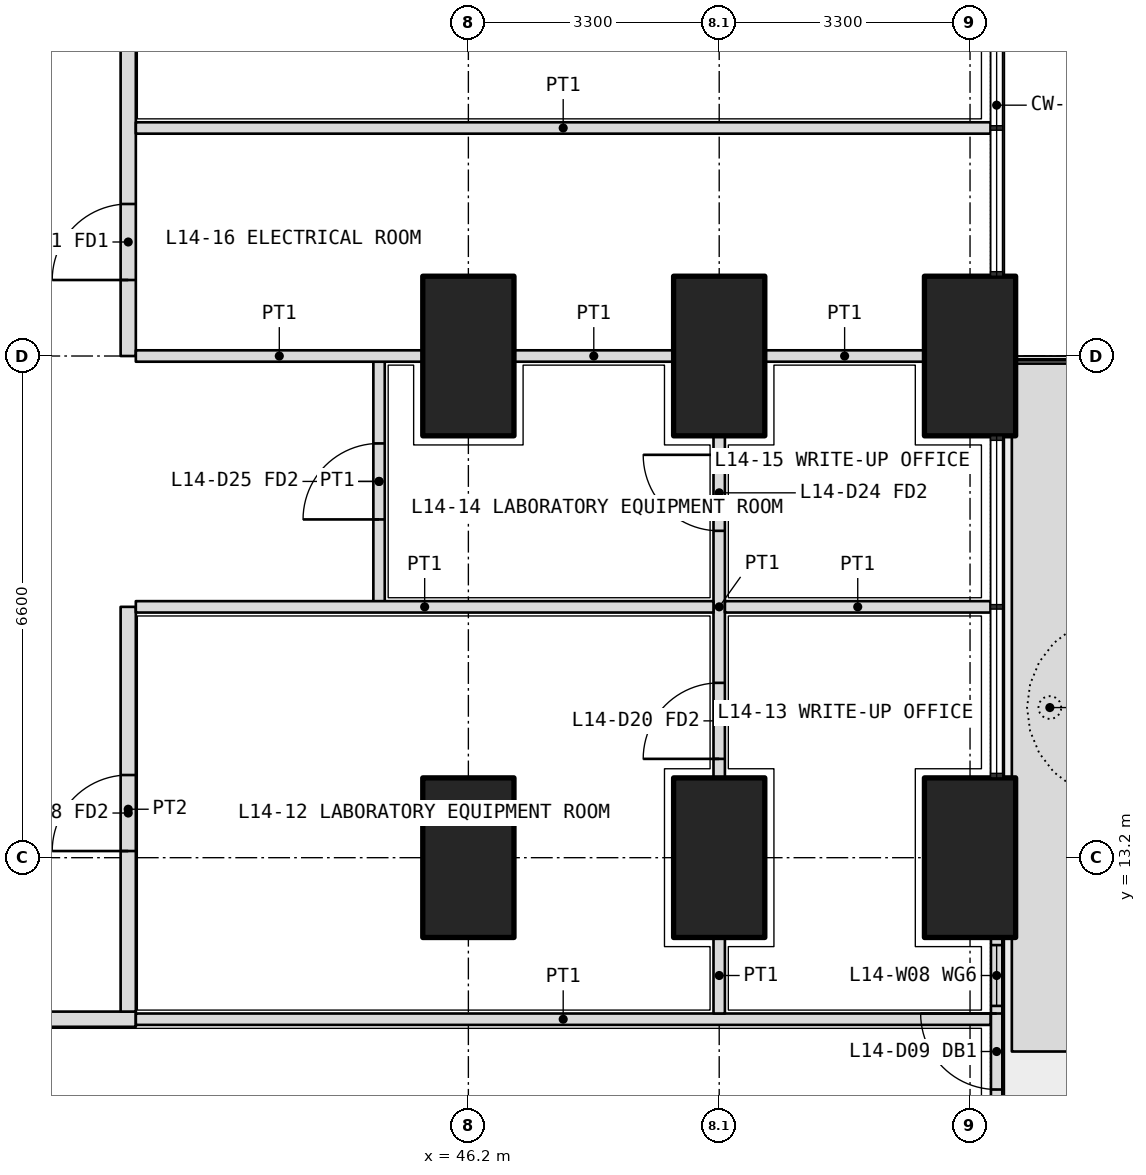
"""IFC4 building model, lengths in metres.
Left out: names, types, materials, properties, quantities, classifications, styles, units other than length and angle.
Written with IfcOpenShell. Run it as: python <this file> out.ifc"""

import sys

from ifc_helpers import new_model, si_unit, direction, frame, frame_2d, origin, origin_2d, place, context, subcontext, project, spatial, polyline, rectangle, outline, extrude, element, fill, save


model = new_model("IFC4")
c1 = context("Model", 3, precision=1e-05, world=origin(), true_north=direction((0.0, 1.0)))
c2 = subcontext(c1, "Body", "Model", "MODEL_VIEW")
j1 = project(units=[si_unit("LENGTHUNIT", "METRE"), si_unit("PLANEANGLEUNIT", "RADIAN")], contexts=[c1])
p1 = place(None, origin())
s1 = spatial("IfcSite", under=j1, at=p1, CompositionType="ELEMENT")
p2 = place(p1, origin())
s2 = spatial("IfcBuilding", under=s1, at=p2, CompositionType="ELEMENT")
p3 = place(p2, frame((0.0, 0.0, 63.3)))
s3 = spatial("IfcBuildingStorey", under=s2, at=p3, CompositionType="ELEMENT", Elevation=63.3)
for number, where, z_axis, x_axis in (
    (1, (52.8, 13.2, 0.0), (0.0, 0.0, 1.0), (0.0, 1.0, 0.0)),
    (2, (52.8, 19.8, 0.0), (0.0, 0.0, 1.0), (0.0, 1.0, 0.0)),
    (3, (49.5, 13.2, 0.0), (0.0, 0.0, 1.0), (0.0, 1.0, 0.0)),
    (4, (49.5, 19.8, 0.0), (0.0, 0.0, 1.0), (0.0, 1.0, 0.0)),
    (5, (46.2, 13.2, 0.0), (0.0, 0.0, 1.0), (0.0, 1.0, 0.0)),
    (6, (46.2, 19.8, 0.0), (0.0, 0.0, 1.0), (0.0, 1.0, 0.0)),
):
    element("IfcColumn", number, at=place(p3, frame(where, z_axis=z_axis, x_axis=x_axis)), inside=s3, PredefinedType="COLUMN", context=c2, shape_type="SweptSolid", body=[
        extrude(rectangle(XDim=2.1, YDim=1.2, at=origin_2d()), origin(), (0.0, 0.0, 1.0), 4.2),
    ])
p4 = place(p3, origin())
e7 = element("IfcWall", 7, at=p4, inside=s3, PredefinedType="USERDEFINED", context=c2, shape_type="SweptSolid", body=[
    extrude(outline(polyline([(53.35, 10.65), (54.35, 10.65), (54.35, 19.7), (53.35, 19.7), (53.35, 10.65)]), holes=[polyline([(53.5, 10.8), (54.2, 10.8), (54.2, 19.55), (53.5, 19.55), (53.5, 10.8)])]), origin(), (0.0, 0.0, 1.0), 1.05),
])
p5 = place(p3, frame((53.15, 7.65, 0.0), z_axis=(0.0, 0.0, 1.0), x_axis=(0.0, 1.0, 0.0)))
e8 = element("IfcWall", 8, at=p5, inside=s3, PredefinedType="SOLIDWALL", context=c2, shape_type="SweptSolid", body=[
    extrude(rectangle(XDim=4.5, YDim=0.15, at=frame_2d((2.25, 0.0))), origin(), (0.0, 0.0, 1.0), 2.6),
])
p6 = place(p5, frame((2.5, 0.0, 0.0)))
e9 = element("IfcOpeningElement", 9, at=p6, cuts=e8, PredefinedType="OPENING", context=c2, shape_type="SweptSolid", body=[
    extrude(rectangle(XDim=1.0, YDim=2.4, at=frame_2d((0.5, 1.2))), frame((0.0, 0.085, 0.0), z_axis=(0.0, -1.0, 0.0), x_axis=(1.0, 0.0, 0.0)), (0.0, 0.0, 1.0), 0.17),
])
p7 = place(p5, frame((0.1, 0.0, 0.1)))
e10 = element("IfcOpeningElement", 10, at=p7, cuts=e8, PredefinedType="OPENING", context=c2, shape_type="SweptSolid", body=[
    extrude(rectangle(XDim=1.9, YDim=2.2, at=frame_2d((0.95, 1.1))), frame((0.0, 0.085, 0.0), z_axis=(0.0, -1.0, 0.0), x_axis=(1.0, 0.0, 0.0)), (0.0, 0.0, 1.0), 0.17),
])
p8 = place(p5, frame((3.6, 0.0, 0.1)))
e11 = element("IfcOpeningElement", 11, at=p8, cuts=e8, PredefinedType="OPENING", context=c2, shape_type="SweptSolid", body=[
    extrude(rectangle(XDim=0.8, YDim=2.2, at=frame_2d((0.4, 1.1))), frame((0.0, 0.085, 0.0), z_axis=(0.0, -1.0, 0.0), x_axis=(1.0, 0.0, 0.0)), (0.0, 0.0, 1.0), 0.17),
])
p9 = place(p3, frame((10.975, 11.075, 0.0), z_axis=(0.0, 0.0, 1.0), x_axis=(1.0, 0.0, 0.0)))
e12 = element("IfcWall", 12, at=p9, inside=s3, PredefinedType="PARTITIONING", context=c2, shape_type="SweptSolid", body=[
    extrude(rectangle(XDim=30.85, YDim=0.2, at=frame_2d((15.425, 0.0))), origin(), (0.0, 0.0, 1.0), 2.85),
])
p10 = place(p9, frame((0.663, 0.0, 0.0)))
e13 = element("IfcOpeningElement", 13, at=p10, cuts=e12, PredefinedType="OPENING", context=c2, shape_type="SweptSolid", body=[
    extrude(rectangle(XDim=1.0, YDim=2.1, at=frame_2d((0.5, 1.05))), frame((0.0, 0.11, 0.0), z_axis=(0.0, -1.0, 0.0), x_axis=(1.0, 0.0, 0.0)), (0.0, 0.0, 1.0), 0.22),
])
p11 = place(p9, frame((3.275, 0.0, 0.0)))
e14 = element("IfcOpeningElement", 14, at=p11, cuts=e12, PredefinedType="OPENING", context=c2, shape_type="SweptSolid", body=[
    extrude(rectangle(XDim=1.2, YDim=2.1, at=frame_2d((0.6, 1.05))), frame((0.0, 0.11, 0.0), z_axis=(0.0, -1.0, 0.0), x_axis=(1.0, 0.0, 0.0)), (0.0, 0.0, 1.0), 0.22),
])
p12 = place(p9, frame((7.125, 0.0, 0.0)))
e15 = element("IfcOpeningElement", 15, at=p12, cuts=e12, PredefinedType="OPENING", context=c2, shape_type="SweptSolid", body=[
    extrude(rectangle(XDim=1.0, YDim=2.1, at=frame_2d((0.5, 1.05))), frame((0.0, 0.11, 0.0), z_axis=(0.0, -1.0, 0.0), x_axis=(1.0, 0.0, 0.0)), (0.0, 0.0, 1.0), 0.22),
])
p13 = place(p9, frame((10.425, 0.0, 0.0)))
e16 = element("IfcOpeningElement", 16, at=p13, cuts=e12, PredefinedType="OPENING", context=c2, shape_type="SweptSolid", body=[
    extrude(rectangle(XDim=1.0, YDim=2.1, at=frame_2d((0.5, 1.05))), frame((0.0, 0.11, 0.0), z_axis=(0.0, -1.0, 0.0), x_axis=(1.0, 0.0, 0.0)), (0.0, 0.0, 1.0), 0.22),
])
p14 = place(p9, frame((14.825, 0.0, 0.0)))
e17 = element("IfcOpeningElement", 17, at=p14, cuts=e12, PredefinedType="OPENING", context=c2, shape_type="SweptSolid", body=[
    extrude(rectangle(XDim=1.2, YDim=2.1, at=frame_2d((0.6, 1.05))), frame((0.0, 0.11, 0.0), z_axis=(0.0, -1.0, 0.0), x_axis=(1.0, 0.0, 0.0)), (0.0, 0.0, 1.0), 0.22),
])
p15 = place(p9, frame((19.875, 0.0, 0.0)))
e18 = element("IfcOpeningElement", 18, at=p15, cuts=e12, PredefinedType="OPENING", context=c2, shape_type="SweptSolid", body=[
    extrude(rectangle(XDim=1.0, YDim=2.1, at=frame_2d((0.5, 1.05))), frame((0.0, 0.11, 0.0), z_axis=(0.0, -1.0, 0.0), x_axis=(1.0, 0.0, 0.0)), (0.0, 0.0, 1.0), 0.22),
])
p16 = place(p9, frame((25.887, 0.0, 0.0)))
e19 = element("IfcOpeningElement", 19, at=p16, cuts=e12, PredefinedType="OPENING", context=c2, shape_type="SweptSolid", body=[
    extrude(rectangle(XDim=1.0, YDim=2.1, at=frame_2d((0.5, 1.05))), frame((0.0, 0.11, 0.0), z_axis=(0.0, -1.0, 0.0), x_axis=(1.0, 0.0, 0.0)), (0.0, 0.0, 1.0), 0.22),
])
p17 = place(p3, frame((41.725, 11.175, 0.0), z_axis=(0.0, 0.0, 1.0), x_axis=(0.0, 1.0, 0.0)))
e20 = element("IfcWall", 20, at=p17, inside=s3, PredefinedType="PARTITIONING", context=c2, shape_type="SweptSolid", body=[
    extrude(rectangle(XDim=5.325, YDim=0.2, at=frame_2d((2.663, 0.0))), origin(), (0.0, 0.0, 1.0), 2.85),
])
p18 = place(p17, frame((2.113, 0.0, 0.0)))
e21 = element("IfcOpeningElement", 21, at=p18, cuts=e20, PredefinedType="OPENING", context=c2, shape_type="SweptSolid", body=[
    extrude(rectangle(XDim=1.0, YDim=2.1, at=frame_2d((0.5, 1.05))), frame((0.0, 0.11, 0.0), z_axis=(0.0, -1.0, 0.0), x_axis=(1.0, 0.0, 0.0)), (0.0, 0.0, 1.0), 0.22),
])
p19 = place(p3, frame((41.725, 19.8, 0.0), z_axis=(0.0, 0.0, 1.0), x_axis=(0.0, 1.0, 0.0)))
e22 = element("IfcWall", 22, at=p19, inside=s3, PredefinedType="PARTITIONING", context=c2, shape_type="SweptSolid", body=[
    extrude(rectangle(XDim=15.225, YDim=0.2, at=frame_2d((7.612, 0.0))), origin(), (0.0, 0.0, 1.0), 2.85),
])
p20 = place(p19, frame((1.0, 0.0, 0.0)))
e23 = element("IfcOpeningElement", 23, at=p20, cuts=e22, PredefinedType="OPENING", context=c2, shape_type="SweptSolid", body=[
    extrude(rectangle(XDim=1.0, YDim=2.1, at=frame_2d((0.5, 1.05))), frame((0.0, 0.11, 0.0), z_axis=(0.0, -1.0, 0.0), x_axis=(1.0, 0.0, 0.0)), (0.0, 0.0, 1.0), 0.22),
])
p21 = place(p19, frame((4.35, 0.0, 0.0)))
e24 = element("IfcOpeningElement", 24, at=p21, cuts=e22, PredefinedType="OPENING", context=c2, shape_type="SweptSolid", body=[
    extrude(rectangle(XDim=0.9, YDim=2.1, at=frame_2d((0.45, 1.05))), frame((0.0, 0.11, 0.0), z_axis=(0.0, -1.0, 0.0), x_axis=(1.0, 0.0, 0.0)), (0.0, 0.0, 1.0), 0.22),
])
p22 = place(p19, frame((9.3, 0.0, 0.0)))
e25 = element("IfcOpeningElement", 25, at=p22, cuts=e22, PredefinedType="OPENING", context=c2, shape_type="SweptSolid", body=[
    extrude(rectangle(XDim=1.2, YDim=2.1, at=frame_2d((0.6, 1.05))), frame((0.0, 0.11, 0.0), z_axis=(0.0, -1.0, 0.0), x_axis=(1.0, 0.0, 0.0)), (0.0, 0.0, 1.0), 0.22),
])
p23 = place(p19, frame((13.762, 0.0, 0.0)))
e26 = element("IfcOpeningElement", 26, at=p23, cuts=e22, PredefinedType="OPENING", context=c2, shape_type="SweptSolid", body=[
    extrude(rectangle(XDim=1.0, YDim=2.1, at=frame_2d((0.5, 1.05))), frame((0.0, 0.11, 0.0), z_axis=(0.0, -1.0, 0.0), x_axis=(1.0, 0.0, 0.0)), (0.0, 0.0, 1.0), 0.22),
])
p24 = place(p3, frame((53.07, 11.075, 0.0), z_axis=(0.0, 0.0, 1.0), x_axis=(-1.0, 0.0, 0.0)))
e27 = element("IfcWall", 27, at=p24, inside=s3, PredefinedType="PARTITIONING", context=c2, shape_type="SweptSolid", body=[
    extrude(rectangle(XDim=11.245, YDim=0.15, at=frame_2d((5.623, 0.0))), origin(), (0.0, 0.0, 1.0), 2.6),
])
p25 = place(p3, frame((49.5, 11.15, 0.0), z_axis=(0.0, 0.0, 1.0), x_axis=(0.0, 1.0, 0.0)))
e28 = element("IfcWall", 28, at=p25, inside=s3, PredefinedType="PARTITIONING", context=c2, shape_type="SweptSolid", body=[
    extrude(rectangle(XDim=1.0, YDim=0.15, at=frame_2d((0.5, 0.0))), origin(), (0.0, 0.0, 1.0), 3.9),
])
p26 = place(p3, frame((49.5, 14.25, 0.0), z_axis=(0.0, 0.0, 1.0), x_axis=(0.0, 1.0, 0.0)))
e29 = element("IfcWall", 29, at=p26, inside=s3, PredefinedType="PARTITIONING", context=c2, shape_type="SweptSolid", body=[
    extrude(rectangle(XDim=4.5, YDim=0.15, at=frame_2d((2.25, 0.0))), origin(), (0.0, 0.0, 1.0), 3.9),
])
p27 = place(p26, frame((0.25, 0.0, 0.0)))
e30 = element("IfcOpeningElement", 30, at=p27, cuts=e29, PredefinedType="OPENING", context=c2, shape_type="SweptSolid", body=[
    extrude(rectangle(XDim=1.0, YDim=2.1, at=frame_2d((0.5, 1.05))), frame((0.0, 0.085, 0.0), z_axis=(0.0, -1.0, 0.0), x_axis=(1.0, 0.0, 0.0)), (0.0, 0.0, 1.0), 0.17),
])
p28 = place(p26, frame((3.25, 0.0, 0.0)))
e31 = element("IfcOpeningElement", 31, at=p28, cuts=e29, PredefinedType="OPENING", context=c2, shape_type="SweptSolid", body=[
    extrude(rectangle(XDim=1.0, YDim=2.1, at=frame_2d((0.5, 1.05))), frame((0.0, 0.085, 0.0), z_axis=(0.0, -1.0, 0.0), x_axis=(1.0, 0.0, 0.0)), (0.0, 0.0, 1.0), 0.17),
])
p29 = place(p3, frame((45.025, 16.5, 0.0), z_axis=(0.0, 0.0, 1.0), x_axis=(0.0, 1.0, 0.0)))
e32 = element("IfcWall", 32, at=p29, inside=s3, PredefinedType="PARTITIONING", context=c2, shape_type="SweptSolid", body=[
    extrude(rectangle(XDim=3.3, YDim=0.15, at=frame_2d((1.65, 0.0))), origin(), (0.0, 0.0, 1.0), 2.85),
])
p30 = place(p29, frame((1.15, 0.0, 0.0)))
e33 = element("IfcOpeningElement", 33, at=p30, cuts=e32, PredefinedType="OPENING", context=c2, shape_type="SweptSolid", body=[
    extrude(rectangle(XDim=1.0, YDim=2.1, at=frame_2d((0.5, 1.05))), frame((0.0, 0.085, 0.0), z_axis=(0.0, -1.0, 0.0), x_axis=(1.0, 0.0, 0.0)), (0.0, 0.0, 1.0), 0.17),
])
p31 = place(p3, frame((53.07, 22.8, 0.0), z_axis=(0.0, 0.0, 1.0), x_axis=(-1.0, 0.0, 0.0)))
e34 = element("IfcWall", 34, at=p31, inside=s3, PredefinedType="PARTITIONING", context=c2, shape_type="SweptSolid", body=[
    extrude(rectangle(XDim=11.245, YDim=0.15, at=frame_2d((5.623, 0.0))), origin(), (0.0, 0.0, 1.0), 2.6),
])
p32 = place(p3, frame((53.07, 16.5, 0.0), z_axis=(0.0, 0.0, 1.0), x_axis=(-1.0, 0.0, 0.0)))
e35 = element("IfcWall", 35, at=p32, inside=s3, PredefinedType="PARTITIONING", context=c2, shape_type="SweptSolid", body=[
    extrude(rectangle(XDim=3.495, YDim=0.15, at=frame_2d((1.748, 0.0))), origin(), (0.0, 0.0, 1.0), 2.6),
])
p33 = place(p3, frame((49.425, 16.5, 0.0), z_axis=(0.0, 0.0, 1.0), x_axis=(-1.0, 0.0, 0.0)))
e36 = element("IfcWall", 36, at=p33, inside=s3, PredefinedType="PARTITIONING", context=c2, shape_type="SweptSolid", body=[
    extrude(rectangle(XDim=7.6, YDim=0.15, at=frame_2d((3.8, 0.0))), origin(), (0.0, 0.0, 1.0), 3.9),
])
for number, where, z_axis, x_axis in (
    (37, (52.2, 19.8, 0.0), (0.0, 0.0, 1.0), (-1.0, 0.0, 0.0)),
    (38, (48.9, 19.8, 0.0), (0.0, 0.0, 1.0), (-1.0, 0.0, 0.0)),
):
    element("IfcWall", number, at=place(p3, frame(where, z_axis=z_axis, x_axis=x_axis)), inside=s3, PredefinedType="PARTITIONING", context=c2, shape_type="SweptSolid", body=[
        extrude(rectangle(XDim=2.1, YDim=0.15, at=frame_2d((1.05, 0.0))), origin(), (0.0, 0.0, 1.0), 2.85),
    ])
p34 = place(p3, frame((45.6, 19.8, 0.0), z_axis=(0.0, 0.0, 1.0), x_axis=(-1.0, 0.0, 0.0)))
e39 = element("IfcWall", 39, at=p34, inside=s3, PredefinedType="PARTITIONING", context=c2, shape_type="SweptSolid", body=[
    extrude(rectangle(XDim=3.775, YDim=0.15, at=frame_2d((1.888, 0.0))), origin(), (0.0, 0.0, 1.0), 2.85),
])
p35 = place(p6, origin())
e40 = element("IfcDoor", 40, at=p35, inside=s3, OperationType="SINGLE_SWING_RIGHT", PredefinedType="DOOR", context=c2, shape_type="SweptSolid", body=[
    extrude(rectangle(XDim=1.0, YDim=2.4, at=frame_2d((0.5, 1.2))), frame((0.0, 0.025, 0.0), z_axis=(0.0, -1.0, 0.0), x_axis=(1.0, 0.0, 0.0)), (0.0, 0.0, 1.0), 0.05),
])
fill(e9, e40)
p36 = place(p8, origin())
e41 = element("IfcWindow", 41, at=p36, inside=s3, PartitioningType="SINGLE_PANEL", PredefinedType="WINDOW", context=c2, shape_type="SweptSolid", body=[
    extrude(rectangle(XDim=0.8, YDim=2.2, at=frame_2d((0.4, 1.1))), frame((0.0, 0.03, 0.0), z_axis=(0.0, -1.0, 0.0), x_axis=(1.0, 0.0, 0.0)), (0.0, 0.0, 1.0), 0.06),
])
fill(e11, e41)
p37 = place(p18, origin())
e42 = element("IfcDoor", 42, at=p37, inside=s3, OperationType="SINGLE_SWING_LEFT", PredefinedType="DOOR", context=c2, shape_type="SweptSolid", body=[
    extrude(rectangle(XDim=1.0, YDim=2.1, at=frame_2d((0.5, 1.05))), frame((0.0, 0.025, 0.0), z_axis=(0.0, -1.0, 0.0), x_axis=(1.0, 0.0, 0.0)), (0.0, 0.0, 1.0), 0.05),
])
fill(e21, e42)
p38 = place(p27, origin())
e43 = element("IfcDoor", 43, at=p38, inside=s3, OperationType="SINGLE_SWING_LEFT", PredefinedType="DOOR", context=c2, shape_type="SweptSolid", body=[
    extrude(rectangle(XDim=1.0, YDim=2.1, at=frame_2d((0.5, 1.05))), frame((0.0, 0.025, 0.0), z_axis=(0.0, -1.0, 0.0), x_axis=(1.0, 0.0, 0.0)), (0.0, 0.0, 1.0), 0.05),
])
fill(e30, e43)
p39 = place(p30, origin())
e44 = element("IfcDoor", 44, at=p39, inside=s3, OperationType="SINGLE_SWING_LEFT", PredefinedType="DOOR", context=c2, shape_type="SweptSolid", body=[
    extrude(rectangle(XDim=1.0, YDim=2.1, at=frame_2d((0.5, 1.05))), frame((0.0, 0.025, 0.0), z_axis=(0.0, -1.0, 0.0), x_axis=(1.0, 0.0, 0.0)), (0.0, 0.0, 1.0), 0.05),
])
fill(e33, e44)
p40 = place(p28, origin())
e45 = element("IfcDoor", 45, at=p40, inside=s3, OperationType="SINGLE_SWING_RIGHT", PredefinedType="DOOR", context=c2, shape_type="SweptSolid", body=[
    extrude(rectangle(XDim=1.0, YDim=2.1, at=frame_2d((0.5, 1.05))), frame((0.0, 0.025, 0.0), z_axis=(0.0, -1.0, 0.0), x_axis=(1.0, 0.0, 0.0)), (0.0, 0.0, 1.0), 0.05),
])
fill(e31, e45)
p41 = place(p20, origin())
e46 = element("IfcDoor", 46, at=p41, inside=s3, OperationType="SINGLE_SWING_LEFT", PredefinedType="DOOR", context=c2, shape_type="SweptSolid", body=[
    extrude(rectangle(XDim=1.0, YDim=2.1, at=frame_2d((0.5, 1.05))), frame((0.0, 0.025, 0.0), z_axis=(0.0, -1.0, 0.0), x_axis=(1.0, 0.0, 0.0)), (0.0, 0.0, 1.0), 0.05),
])
fill(e23, e46)
save(model, sys.argv[1])
